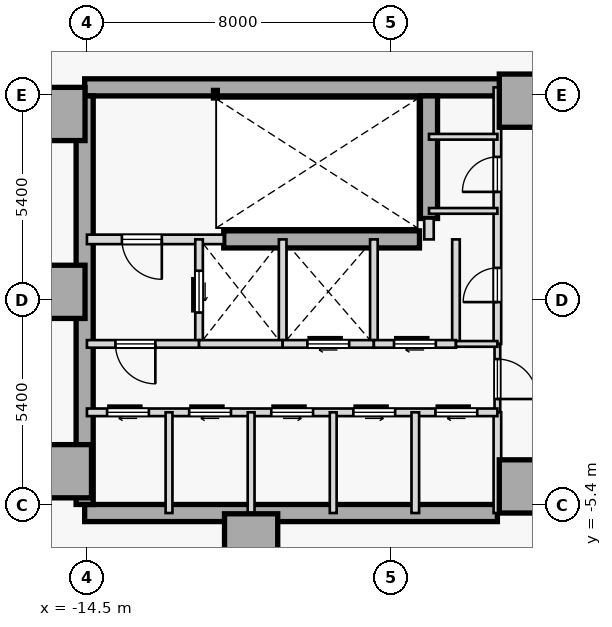
"""IFC4 building model, lengths in metres.
Left out: names, types, materials, properties, quantities, classifications, styles, units other than length and angle.
Written with IfcOpenShell. Run it as: python <this file> out.ifc"""

import sys

from ifc_helpers import new_model, si_unit, direction, frame, frame_2d, origin, origin_2d, place, context, subcontext, project, spatial, rectangle, hollow_rectangle, extrude, element, fill, save


model = new_model("IFC4")
c1 = context("Model", 3, precision=1e-05, world=origin(), true_north=direction((0.0, 1.0)))
c2 = subcontext(c1, "Body", "Model", "MODEL_VIEW")
j1 = project(units=[si_unit("LENGTHUNIT", "METRE"), si_unit("PLANEANGLEUNIT", "RADIAN")], contexts=[c1])
p1 = place(None, origin())
s1 = spatial("IfcSite", under=j1, at=p1, CompositionType="ELEMENT")
p2 = place(p1, origin())
s2 = spatial("IfcBuilding", under=s1, at=p2, CompositionType="ELEMENT")
p3 = place(p2, origin())
s3 = spatial("IfcBuildingStorey", under=s2, at=p3, CompositionType="ELEMENT", Elevation=0.0)
for number, where, z_axis, x_axis in (
    (1, (-15.25, 4.9, 0.0), (0.0, 0.0, 1.0), (1.0, 0.0, 0.0)),
    (2, (-15.25, 0.22, 0.0), (0.0, 0.0, 1.0), (1.0, 0.0, 0.0)),
    (3, (-15.08, -4.5, 0.0), (0.0, 0.0, 1.0), (1.0, 0.0, 0.0)),
    (4, (-10.18, -6.32, 0.0), (0.0, 0.0, 1.0), (1.0, 0.0, 0.0)),
    (5, (-2.95, -4.9, 0.0), (0.0, 0.0, 1.0), (1.0, 0.0, 0.0)),
    (6, (-2.95, 5.25, 0.0), (0.0, 0.0, 1.0), (1.0, 0.0, 0.0)),
):
    element("IfcColumn", number, at=place(p3, frame(where, z_axis=z_axis, x_axis=x_axis)), inside=s3, PredefinedType="COLUMN", context=c2, shape_type="SweptSolid", body=[
        extrude(rectangle(XDim=1.4, YDim=1.4, at=origin_2d()), origin(), (0.0, 0.0, 1.0), 9.6),
    ])
p4 = place(p3, frame((-14.56, 5.6, 0.0), z_axis=(0.0, 0.0, 1.0), x_axis=(1.0, 0.0, 0.0)))
e7 = element("IfcWall", 7, at=p4, inside=s3, PredefinedType="SHEAR", context=c2, shape_type="SweptSolid", body=[
    extrude(rectangle(XDim=11.41, YDim=0.45, at=frame_2d((5.705, 0.0))), origin(), (0.0, 0.0, 1.0), 9.2),
])
p5 = place(p3, frame((-14.56, -5.6, 0.0), z_axis=(0.0, 0.0, 1.0), x_axis=(1.0, 0.0, 0.0)))
e8 = element("IfcWall", 8, at=p5, inside=s3, PredefinedType="SHEAR", context=c2, shape_type="SweptSolid", body=[
    extrude(rectangle(XDim=10.86, YDim=0.45, at=frame_2d((5.43, 0.0))), origin(), (0.0, 0.0, 1.0), 9.2),
])
p6 = place(p3, frame((-14.56, -5.375, 0.0), z_axis=(0.0, 0.0, 1.0), x_axis=(0.0, 1.0, 0.0)))
e9 = element("IfcWall", 9, at=p6, inside=s3, PredefinedType="SHEAR", context=c2, shape_type="SweptSolid", body=[
    extrude(rectangle(XDim=10.75, YDim=0.45, at=frame_2d((5.375, 0.0))), origin(), (0.0, 0.0, 1.0), 9.2),
])
p7 = place(p3, frame((-5.5, 2.15, 0.0), z_axis=(0.0, 0.0, 1.0), x_axis=(0.0, 1.0, 0.0)))
e10 = element("IfcWall", 10, at=p7, inside=s3, PredefinedType="SHEAR", context=c2, shape_type="SweptSolid", body=[
    extrude(rectangle(XDim=3.225, YDim=0.45, at=frame_2d((1.613, 0.0))), origin(), (0.0, 0.0, 1.0), 9.2),
])
p8 = place(p3, frame((-10.9, 1.6, 0.0), z_axis=(0.0, 0.0, 1.0), x_axis=(1.0, 0.0, 0.0)))
e11 = element("IfcWall", 11, at=p8, inside=s3, PredefinedType="SHEAR", context=c2, shape_type="SweptSolid", body=[
    extrude(rectangle(XDim=5.15, YDim=0.45, at=frame_2d((2.575, 0.0))), origin(), (0.0, 0.0, 1.0), 9.2),
])
p9 = place(p3, frame((-11.12, 5.42, 0.0), z_axis=(0.0, 0.0, 1.0), x_axis=(1.0, 0.0, 0.0)))
e12 = element("IfcColumn", 12, at=p9, inside=s3, PredefinedType="COLUMN", context=c2, shape_type="SweptSolid", body=[
    extrude(hollow_rectangle(XDim=0.1, YDim=0.2, WallThickness=0.008, at=origin_2d()), origin(), (0.0, 0.0, 1.0), 9.6),
])
p10 = place(p3, frame((-14.5, 1.6, 0.0), z_axis=(0.0, 0.0, 1.0), x_axis=(1.0, 0.0, 0.0)))
e13 = element("IfcWall", 13, at=p10, inside=s3, PredefinedType="STANDARD", context=c2, shape_type="SweptSolid", body=[
    extrude(rectangle(XDim=3.6, YDim=0.25, at=frame_2d((1.8, 0.0))), origin(), (0.0, 0.0, 1.0), 9.2),
])
p11 = place(p10, frame((0.92, 0.0, 0.0)))
e14 = element("IfcOpeningElement", 14, at=p11, cuts=e13, PredefinedType="OPENING", context=c2, shape_type="SweptSolid", body=[
    extrude(rectangle(XDim=1.05, YDim=2.15, at=frame_2d((0.525, 1.075))), frame((0.0, 0.135, 0.0), z_axis=(0.0, -1.0, 0.0), x_axis=(1.0, 0.0, 0.0)), (0.0, 0.0, 1.0), 0.27),
])
p12 = place(p3, frame((-5.5, 1.6, 0.0), z_axis=(0.0, 0.0, 1.0), x_axis=(0.0, 1.0, 0.0)))
e15 = element("IfcWall", 15, at=p12, inside=s3, PredefinedType="STANDARD", context=c2, shape_type="SweptSolid", body=[
    extrude(rectangle(XDim=0.55, YDim=0.25, at=frame_2d((0.275, 0.0))), origin(), (0.0, 0.0, 1.0), 9.2),
])
p13 = place(p3, frame((-3.7, -1.15, 0.0), z_axis=(0.0, 0.0, 1.0), x_axis=(0.0, 1.0, 0.0)))
e16 = element("IfcWall", 16, at=p13, inside=s3, PredefinedType="STANDARD", context=c2, shape_type="SweptSolid", body=[
    extrude(rectangle(XDim=6.75, YDim=0.2, at=frame_2d((3.375, 0.0))), origin(), (0.0, 0.0, 1.0), 9.2),
])
p14 = place(p13, frame((1.1, 0.0, 0.0)))
e17 = element("IfcOpeningElement", 17, at=p14, cuts=e16, PredefinedType="OPENING", context=c2, shape_type="SweptSolid", body=[
    extrude(rectangle(XDim=0.9, YDim=2.15, at=frame_2d((0.45, 1.075))), frame((0.0, 0.11, 0.0), z_axis=(0.0, -1.0, 0.0), x_axis=(1.0, 0.0, 0.0)), (0.0, 0.0, 1.0), 0.22),
])
p15 = place(p13, frame((4.0, 0.0, 0.0)))
e18 = element("IfcOpeningElement", 18, at=p15, cuts=e16, PredefinedType="OPENING", context=c2, shape_type="SweptSolid", body=[
    extrude(rectangle(XDim=0.92, YDim=2.15, at=frame_2d((0.46, 1.075))), frame((0.0, 0.11, 0.0), z_axis=(0.0, -1.0, 0.0), x_axis=(1.0, 0.0, 0.0)), (0.0, 0.0, 1.0), 0.22),
])
p16 = place(p3, frame((-3.7, -2.95, 0.0), z_axis=(0.0, 0.0, 1.0), x_axis=(0.0, 1.0, 0.0)))
e19 = element("IfcWall", 19, at=p16, inside=s3, PredefinedType="PARTITIONING", context=c2, shape_type="SweptSolid", body=[
    extrude(rectangle(XDim=1.8, YDim=0.15, at=frame_2d((0.9, 0.0))), origin(), (0.0, 0.0, 1.0), 9.2),
])
p17 = place(p16, frame((0.35, 0.0, 0.0)))
e20 = element("IfcOpeningElement", 20, at=p17, cuts=e19, PredefinedType="OPENING", context=c2, shape_type="SweptSolid", body=[
    extrude(rectangle(XDim=1.05, YDim=2.18, at=frame_2d((0.525, 1.09))), frame((0.0, 0.085, 0.0), z_axis=(0.0, -1.0, 0.0), x_axis=(1.0, 0.0, 0.0)), (0.0, 0.0, 1.0), 0.17),
])
p18 = place(p3, frame((-3.7, -5.6, 0.0), z_axis=(0.0, 0.0, 1.0), x_axis=(0.0, 1.0, 0.0)))
e21 = element("IfcWall", 21, at=p18, inside=s3, PredefinedType="STANDARD", context=c2, shape_type="SweptSolid", body=[
    extrude(rectangle(XDim=2.65, YDim=0.2, at=frame_2d((1.325, 0.0))), origin(), (0.0, 0.0, 1.0), 9.2),
])
p19 = place(p3, frame((-11.55, -1.15, 0.0), z_axis=(0.0, 0.0, 1.0), x_axis=(0.0, 1.0, 0.0)))
e22 = element("IfcWall", 22, at=p19, inside=s3, PredefinedType="STANDARD", context=c2, shape_type="SweptSolid", body=[
    extrude(rectangle(XDim=2.75, YDim=0.2, at=frame_2d((1.375, 0.0))), origin(), (0.0, 0.0, 1.0), 9.2),
])
p20 = place(p19, frame((0.825, 0.0, 0.0)))
e23 = element("IfcOpeningElement", 23, at=p20, cuts=e22, PredefinedType="OPENING", context=c2, shape_type="SweptSolid", body=[
    extrude(rectangle(XDim=1.1, YDim=2.15, at=frame_2d((0.55, 1.075))), frame((0.0, 0.11, 0.0), z_axis=(0.0, -1.0, 0.0), x_axis=(1.0, 0.0, 0.0)), (0.0, 0.0, 1.0), 0.22),
])
p21 = place(p3, frame((-9.35, -1.15, 0.0), z_axis=(0.0, 0.0, 1.0), x_axis=(0.0, 1.0, 0.0)))
e24 = element("IfcWall", 24, at=p21, inside=s3, PredefinedType="STANDARD", context=c2, shape_type="SweptSolid", body=[
    extrude(rectangle(XDim=2.75, YDim=0.2, at=frame_2d((1.375, 0.0))), origin(), (0.0, 0.0, 1.0), 9.2),
])
p22 = place(p3, frame((-14.5, -1.15, 0.0), z_axis=(0.0, 0.0, 1.0), x_axis=(1.0, 0.0, 0.0)))
e25 = element("IfcWall", 25, at=p22, inside=s3, PredefinedType="STANDARD", context=c2, shape_type="SweptSolid", body=[
    extrude(rectangle(XDim=2.95, YDim=0.2, at=frame_2d((1.475, 0.0))), origin(), (0.0, 0.0, 1.0), 9.2),
])
p23 = place(p22, frame((0.75, 0.0, 0.0)))
e26 = element("IfcOpeningElement", 26, at=p23, cuts=e25, PredefinedType="OPENING", context=c2, shape_type="SweptSolid", body=[
    extrude(rectangle(XDim=1.05, YDim=2.18, at=frame_2d((0.525, 1.09))), frame((0.0, 0.11, 0.0), z_axis=(0.0, -1.0, 0.0), x_axis=(1.0, 0.0, 0.0)), (0.0, 0.0, 1.0), 0.22),
])
p24 = place(p3, frame((-11.55, -1.15, 0.0), z_axis=(0.0, 0.0, 1.0), x_axis=(1.0, 0.0, 0.0)))
e27 = element("IfcWall", 27, at=p24, inside=s3, PredefinedType="STANDARD", context=c2, shape_type="SweptSolid", body=[
    extrude(rectangle(XDim=2.2, YDim=0.2, at=frame_2d((1.1, 0.0))), origin(), (0.0, 0.0, 1.0), 9.2),
])
p25 = place(p3, frame((-6.95, -1.15, 0.0), z_axis=(0.0, 0.0, 1.0), x_axis=(0.0, 1.0, 0.0)))
e28 = element("IfcWall", 28, at=p25, inside=s3, PredefinedType="STANDARD", context=c2, shape_type="SweptSolid", body=[
    extrude(rectangle(XDim=2.75, YDim=0.2, at=frame_2d((1.375, 0.0))), origin(), (0.0, 0.0, 1.0), 9.2),
])
p26 = place(p3, frame((-9.35, -1.15, 0.0), z_axis=(0.0, 0.0, 1.0), x_axis=(1.0, 0.0, 0.0)))
e29 = element("IfcWall", 29, at=p26, inside=s3, PredefinedType="STANDARD", context=c2, shape_type="SweptSolid", body=[
    extrude(rectangle(XDim=2.4, YDim=0.2, at=frame_2d((1.2, 0.0))), origin(), (0.0, 0.0, 1.0), 9.2),
])
p27 = place(p26, frame((0.65, 0.0, 0.0)))
e30 = element("IfcOpeningElement", 30, at=p27, cuts=e29, PredefinedType="OPENING", context=c2, shape_type="SweptSolid", body=[
    extrude(rectangle(XDim=1.1, YDim=2.15, at=frame_2d((0.55, 1.075))), frame((0.0, 0.11, 0.0), z_axis=(0.0, -1.0, 0.0), x_axis=(1.0, 0.0, 0.0)), (0.0, 0.0, 1.0), 0.22),
])
p28 = place(p3, frame((-4.79, -1.15, 0.0), z_axis=(0.0, 0.0, 1.0), x_axis=(0.0, 1.0, 0.0)))
e31 = element("IfcWall", 31, at=p28, inside=s3, PredefinedType="STANDARD", context=c2, shape_type="SweptSolid", body=[
    extrude(rectangle(XDim=2.75, YDim=0.2, at=frame_2d((1.375, 0.0))), origin(), (0.0, 0.0, 1.0), 9.2),
])
p29 = place(p3, frame((-6.95, -1.15, 0.0), z_axis=(0.0, 0.0, 1.0), x_axis=(1.0, 0.0, 0.0)))
e32 = element("IfcWall", 32, at=p29, inside=s3, PredefinedType="STANDARD", context=c2, shape_type="SweptSolid", body=[
    extrude(rectangle(XDim=2.16, YDim=0.2, at=frame_2d((1.08, 0.0))), origin(), (0.0, 0.0, 1.0), 9.2),
])
p30 = place(p29, frame((0.53, 0.0, 0.0)))
e33 = element("IfcOpeningElement", 33, at=p30, cuts=e32, PredefinedType="OPENING", context=c2, shape_type="SweptSolid", body=[
    extrude(rectangle(XDim=1.1, YDim=2.15, at=frame_2d((0.55, 1.075))), frame((0.0, 0.11, 0.0), z_axis=(0.0, -1.0, 0.0), x_axis=(1.0, 0.0, 0.0)), (0.0, 0.0, 1.0), 0.22),
])
p31 = place(p3, frame((-4.79, -1.15, 0.0), z_axis=(0.0, 0.0, 1.0), x_axis=(1.0, 0.0, 0.0)))
e34 = element("IfcWall", 34, at=p31, inside=s3, PredefinedType="PARTITIONING", context=c2, shape_type="SweptSolid", body=[
    extrude(rectangle(XDim=1.09, YDim=0.15, at=frame_2d((0.545, 0.0))), origin(), (0.0, 0.0, 1.0), 9.2),
])
p32 = place(p3, frame((-14.5, -2.95, 0.0), z_axis=(0.0, 0.0, 1.0), x_axis=(1.0, 0.0, 0.0)))
e35 = element("IfcWall", 35, at=p32, inside=s3, PredefinedType="STANDARD", context=c2, shape_type="SweptSolid", body=[
    extrude(rectangle(XDim=10.8, YDim=0.2, at=frame_2d((5.4, 0.0))), origin(), (0.0, 0.0, 1.0), 9.2),
])
p33 = place(p32, frame((0.53, 0.0, 0.0)))
e36 = element("IfcOpeningElement", 36, at=p33, cuts=e35, PredefinedType="OPENING", context=c2, shape_type="SweptSolid", body=[
    extrude(rectangle(XDim=1.1, YDim=2.15, at=frame_2d((0.55, 1.075))), frame((0.0, 0.11, 0.0), z_axis=(0.0, -1.0, 0.0), x_axis=(1.0, 0.0, 0.0)), (0.0, 0.0, 1.0), 0.22),
])
p34 = place(p32, frame((2.69, 0.0, 0.0)))
e37 = element("IfcOpeningElement", 37, at=p34, cuts=e35, PredefinedType="OPENING", context=c2, shape_type="SweptSolid", body=[
    extrude(rectangle(XDim=1.1, YDim=2.15, at=frame_2d((0.55, 1.075))), frame((0.0, 0.11, 0.0), z_axis=(0.0, -1.0, 0.0), x_axis=(1.0, 0.0, 0.0)), (0.0, 0.0, 1.0), 0.22),
])
p35 = place(p32, frame((4.85, 0.0, 0.0)))
e38 = element("IfcOpeningElement", 38, at=p35, cuts=e35, PredefinedType="OPENING", context=c2, shape_type="SweptSolid", body=[
    extrude(rectangle(XDim=1.1, YDim=2.15, at=frame_2d((0.55, 1.075))), frame((0.0, 0.11, 0.0), z_axis=(0.0, -1.0, 0.0), x_axis=(1.0, 0.0, 0.0)), (0.0, 0.0, 1.0), 0.22),
])
p36 = place(p32, frame((7.01, 0.0, 0.0)))
e39 = element("IfcOpeningElement", 39, at=p36, cuts=e35, PredefinedType="OPENING", context=c2, shape_type="SweptSolid", body=[
    extrude(rectangle(XDim=1.1, YDim=2.15, at=frame_2d((0.55, 1.075))), frame((0.0, 0.11, 0.0), z_axis=(0.0, -1.0, 0.0), x_axis=(1.0, 0.0, 0.0)), (0.0, 0.0, 1.0), 0.22),
])
p37 = place(p32, frame((9.17, 0.0, 0.0)))
e40 = element("IfcOpeningElement", 40, at=p37, cuts=e35, PredefinedType="OPENING", context=c2, shape_type="SweptSolid", body=[
    extrude(rectangle(XDim=1.1, YDim=2.15, at=frame_2d((0.55, 1.075))), frame((0.0, 0.11, 0.0), z_axis=(0.0, -1.0, 0.0), x_axis=(1.0, 0.0, 0.0)), (0.0, 0.0, 1.0), 0.22),
])
p38 = place(p3, frame((-5.86, -5.6, 0.0), z_axis=(0.0, 0.0, 1.0), x_axis=(0.0, 1.0, 0.0)))
e41 = element("IfcWall", 41, at=p38, inside=s3, PredefinedType="STANDARD", context=c2, shape_type="SweptSolid", body=[
    extrude(rectangle(XDim=2.65, YDim=0.2, at=frame_2d((1.325, 0.0))), origin(), (0.0, 0.0, 1.0), 9.2),
])
for number, where, z_axis, x_axis in (
    (42, (-12.34, -5.6, 0.0), (0.0, 0.0, 1.0), (0.0, 1.0, 0.0)),
    (43, (-10.18, -5.6, 0.0), (0.0, 0.0, 1.0), (0.0, 1.0, 0.0)),
    (44, (-8.02, -5.6, 0.0), (0.0, 0.0, 1.0), (0.0, 1.0, 0.0)),
):
    element("IfcWall", number, at=place(p3, frame(where, z_axis=z_axis, x_axis=x_axis)), inside=s3, PredefinedType="STANDARD", context=c2, shape_type="SweptSolid", body=[
        extrude(rectangle(XDim=2.65, YDim=0.18, at=frame_2d((1.325, 0.0))), origin(), (0.0, 0.0, 1.0), 9.2),
    ])
for number, where, z_axis, x_axis in (
    (45, (-5.5, 4.3, 0.0), (0.0, 0.0, 1.0), (1.0, 0.0, 0.0)),
    (46, (-5.5, 2.35, 0.0), (0.0, 0.0, 1.0), (1.0, 0.0, 0.0)),
):
    element("IfcWall", number, at=place(p3, frame(where, z_axis=z_axis, x_axis=x_axis)), inside=s3, PredefinedType="PARTITIONING", context=c2, shape_type="SweptSolid", body=[
        extrude(rectangle(XDim=1.8, YDim=0.15, at=frame_2d((0.9, 0.0))), origin(), (0.0, 0.0, 1.0), 9.2),
    ])
p39 = place(p11, frame((1.05, 0.0, 0.0), z_axis=(0.0, 0.0, 1.0), x_axis=(-1.0, 0.0, 0.0)))
e47 = element("IfcDoor", 47, at=p39, inside=s3, OperationType="SINGLE_SWING_RIGHT", PredefinedType="DOOR", context=c2, shape_type="SweptSolid", body=[
    extrude(rectangle(XDim=1.05, YDim=2.15, at=frame_2d((0.525, 1.075))), frame((0.0, 0.025, 0.0), z_axis=(0.0, -1.0, 0.0), x_axis=(1.0, 0.0, 0.0)), (0.0, 0.0, 1.0), 0.05),
])
fill(e14, e47)
p40 = place(p23, frame((1.05, 0.0, 0.0), z_axis=(0.0, 0.0, 1.0), x_axis=(-1.0, 0.0, 0.0)))
e48 = element("IfcDoor", 48, at=p40, inside=s3, OperationType="SINGLE_SWING_RIGHT", PredefinedType="DOOR", context=c2, shape_type="SweptSolid", body=[
    extrude(rectangle(XDim=1.05, YDim=2.18, at=frame_2d((0.525, 1.09))), frame((0.0, 0.025, 0.0), z_axis=(0.0, -1.0, 0.0), x_axis=(1.0, 0.0, 0.0)), (0.0, 0.0, 1.0), 0.05),
])
fill(e26, e48)
p41 = place(p17, frame((1.05, 0.0, 0.0), z_axis=(0.0, 0.0, 1.0), x_axis=(-1.0, 0.0, 0.0)))
e49 = element("IfcDoor", 49, at=p41, inside=s3, OperationType="SINGLE_SWING_LEFT", PredefinedType="DOOR", context=c2, shape_type="SweptSolid", body=[
    extrude(rectangle(XDim=1.05, YDim=2.18, at=frame_2d((0.525, 1.09))), frame((0.0, 0.025, 0.0), z_axis=(0.0, -1.0, 0.0), x_axis=(1.0, 0.0, 0.0)), (0.0, 0.0, 1.0), 0.05),
])
fill(e20, e49)
p42 = place(p20, origin())
e50 = element("IfcDoor", 50, at=p42, inside=s3, OperationType="SLIDING_TO_RIGHT", PredefinedType="DOOR", context=c2, shape_type="SweptSolid", body=[
    extrude(rectangle(XDim=1.1, YDim=2.15, at=frame_2d((0.55, 1.075))), frame((0.0, 0.025, 0.0), z_axis=(0.0, -1.0, 0.0), x_axis=(1.0, 0.0, 0.0)), (0.0, 0.0, 1.0), 0.05),
])
fill(e23, e50)
p43 = place(p27, origin())
e51 = element("IfcDoor", 51, at=p43, inside=s3, OperationType="SLIDING_TO_RIGHT", PredefinedType="DOOR", context=c2, shape_type="SweptSolid", body=[
    extrude(rectangle(XDim=1.1, YDim=2.15, at=frame_2d((0.55, 1.075))), frame((0.0, 0.025, 0.0), z_axis=(0.0, -1.0, 0.0), x_axis=(1.0, 0.0, 0.0)), (0.0, 0.0, 1.0), 0.05),
])
fill(e30, e51)
p44 = place(p30, origin())
e52 = element("IfcDoor", 52, at=p44, inside=s3, OperationType="SLIDING_TO_RIGHT", PredefinedType="DOOR", context=c2, shape_type="SweptSolid", body=[
    extrude(rectangle(XDim=1.1, YDim=2.15, at=frame_2d((0.55, 1.075))), frame((0.0, 0.025, 0.0), z_axis=(0.0, -1.0, 0.0), x_axis=(1.0, 0.0, 0.0)), (0.0, 0.0, 1.0), 0.05),
])
fill(e33, e52)
p45 = place(p33, origin())
e53 = element("IfcDoor", 53, at=p45, inside=s3, OperationType="SLIDING_TO_RIGHT", PredefinedType="DOOR", context=c2, shape_type="SweptSolid", body=[
    extrude(rectangle(XDim=1.1, YDim=2.15, at=frame_2d((0.55, 1.075))), frame((0.0, 0.025, 0.0), z_axis=(0.0, -1.0, 0.0), x_axis=(1.0, 0.0, 0.0)), (0.0, 0.0, 1.0), 0.05),
])
fill(e36, e53)
p46 = place(p34, origin())
e54 = element("IfcDoor", 54, at=p46, inside=s3, OperationType="SLIDING_TO_RIGHT", PredefinedType="DOOR", context=c2, shape_type="SweptSolid", body=[
    extrude(rectangle(XDim=1.1, YDim=2.15, at=frame_2d((0.55, 1.075))), frame((0.0, 0.025, 0.0), z_axis=(0.0, -1.0, 0.0), x_axis=(1.0, 0.0, 0.0)), (0.0, 0.0, 1.0), 0.05),
])
fill(e37, e54)
p47 = place(p35, origin())
e55 = element("IfcDoor", 55, at=p47, inside=s3, OperationType="SLIDING_TO_LEFT", PredefinedType="DOOR", context=c2, shape_type="SweptSolid", body=[
    extrude(rectangle(XDim=1.1, YDim=2.15, at=frame_2d((0.55, 1.075))), frame((0.0, 0.025, 0.0), z_axis=(0.0, -1.0, 0.0), x_axis=(1.0, 0.0, 0.0)), (0.0, 0.0, 1.0), 0.05),
])
fill(e38, e55)
p48 = place(p36, origin())
e56 = element("IfcDoor", 56, at=p48, inside=s3, OperationType="SLIDING_TO_LEFT", PredefinedType="DOOR", context=c2, shape_type="SweptSolid", body=[
    extrude(rectangle(XDim=1.1, YDim=2.15, at=frame_2d((0.55, 1.075))), frame((0.0, 0.025, 0.0), z_axis=(0.0, -1.0, 0.0), x_axis=(1.0, 0.0, 0.0)), (0.0, 0.0, 1.0), 0.05),
])
fill(e39, e56)
p49 = place(p37, origin())
e57 = element("IfcDoor", 57, at=p49, inside=s3, OperationType="SLIDING_TO_RIGHT", PredefinedType="DOOR", context=c2, shape_type="SweptSolid", body=[
    extrude(rectangle(XDim=1.1, YDim=2.15, at=frame_2d((0.55, 1.075))), frame((0.0, 0.025, 0.0), z_axis=(0.0, -1.0, 0.0), x_axis=(1.0, 0.0, 0.0)), (0.0, 0.0, 1.0), 0.05),
])
fill(e40, e57)
p50 = place(p14, origin())
e58 = element("IfcDoor", 58, at=p50, inside=s3, OperationType="SINGLE_SWING_LEFT", PredefinedType="DOOR", context=c2, shape_type="SweptSolid", body=[
    extrude(rectangle(XDim=0.9, YDim=2.15, at=frame_2d((0.45, 1.075))), frame((0.0, 0.025, 0.0), z_axis=(0.0, -1.0, 0.0), x_axis=(1.0, 0.0, 0.0)), (0.0, 0.0, 1.0), 0.05),
])
fill(e17, e58)
p51 = place(p15, origin())
e59 = element("IfcDoor", 59, at=p51, inside=s3, OperationType="SINGLE_SWING_LEFT", PredefinedType="DOOR", context=c2, shape_type="SweptSolid", body=[
    extrude(rectangle(XDim=0.92, YDim=2.15, at=frame_2d((0.46, 1.075))), frame((0.0, 0.025, 0.0), z_axis=(0.0, -1.0, 0.0), x_axis=(1.0, 0.0, 0.0)), (0.0, 0.0, 1.0), 0.05),
])
fill(e18, e59)
save(model, sys.argv[1])
